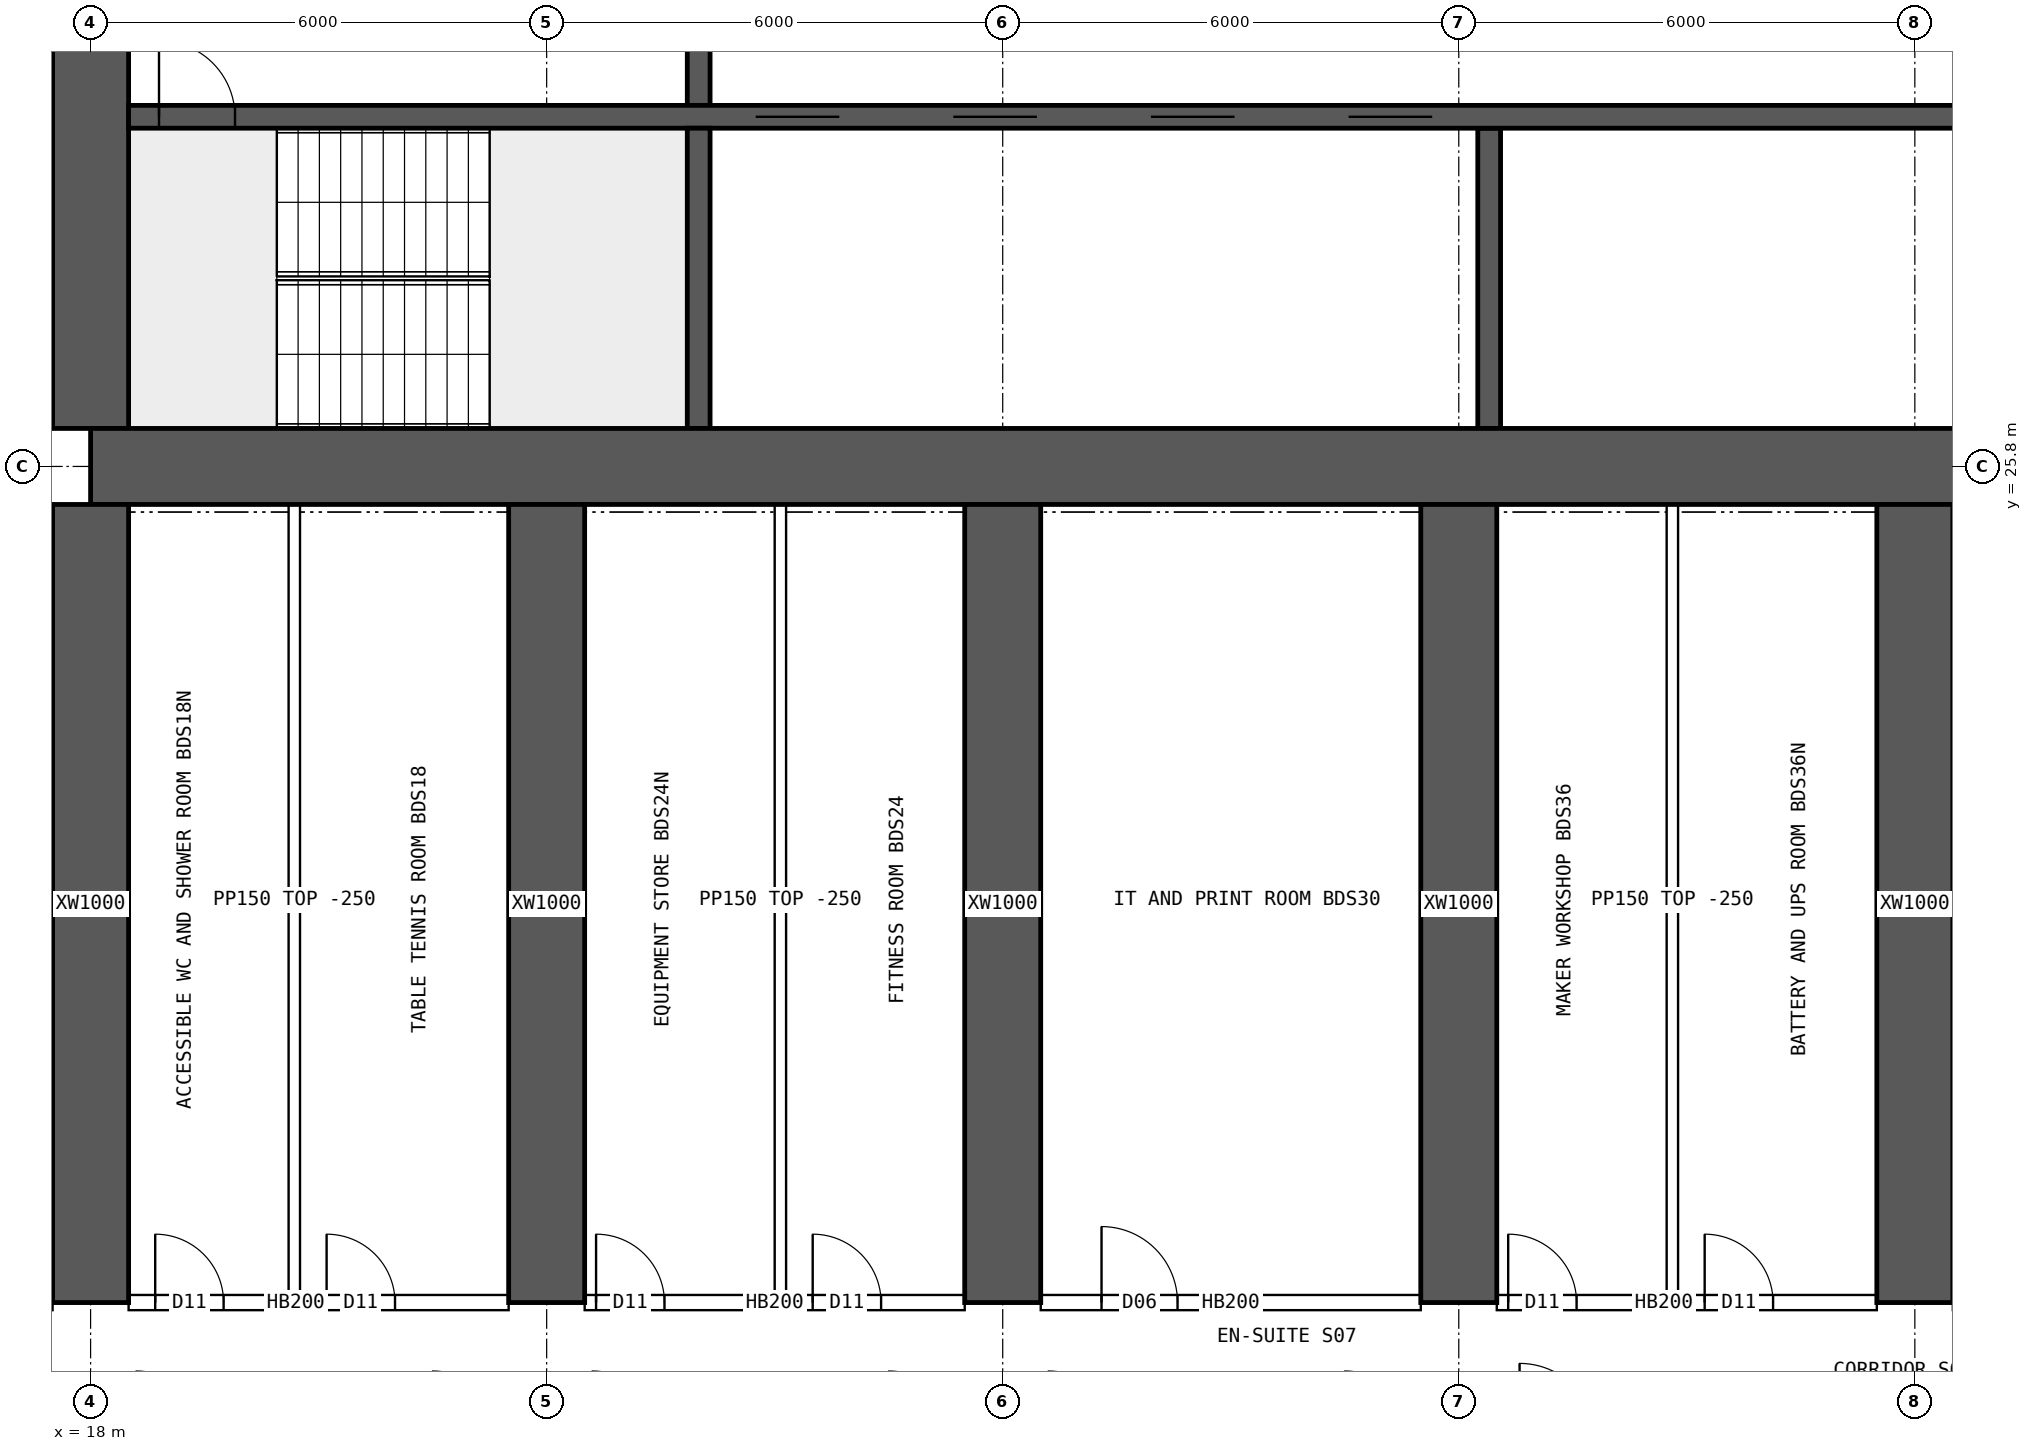
"""IFC4 building model, lengths in metres.
Left out: names, types, materials, properties, quantities, classifications, styles, units other than length and angle.
Written with IfcOpenShell. Run it as: python <this file> out.ifc"""

import sys

from ifc_helpers import new_model, si_unit, direction, frame, frame_2d, origin, place, context, subcontext, project, spatial, rectangle, extrude, element, fill, save


model = new_model("IFC4")
c1 = context("Model", 3, precision=1e-05, world=origin(), true_north=direction((0.0, 1.0)))
c2 = subcontext(c1, "Body", "Model", "MODEL_VIEW")
j1 = project(units=[si_unit("LENGTHUNIT", "METRE"), si_unit("PLANEANGLEUNIT", "RADIAN")], contexts=[c1])
p1 = place(None, origin())
s1 = spatial("IfcSite", under=j1, at=p1, CompositionType="ELEMENT")
p2 = place(p1, origin())
s2 = spatial("IfcBuilding", under=s1, at=p2, CompositionType="ELEMENT")
p3 = place(p2, frame((0.0, 0.0, 38.95)))
s3 = spatial("IfcBuildingStorey", under=s2, at=p3, CompositionType="ELEMENT", Elevation=38.95)
p4 = place(p3, frame((18.0, 25.8, 0.0), z_axis=(0.0, 0.0, 1.0), x_axis=(1.0, 0.0, 0.0)))
e1 = element("IfcWall", 1, at=p4, inside=s3, PredefinedType="SHEAR", context=c2, shape_type="SweptSolid", body=[
    extrude(rectangle(XDim=48.0, YDim=1.0, at=frame_2d((24.0, 0.0))), origin(), (0.0, 0.0, 1.0), 3.75),
])
p5 = place(p3, frame((18.0, 26.3, 0.0), z_axis=(0.0, 0.0, 1.0), x_axis=(0.0, 1.0, 0.0)))
e2 = element("IfcWall", 2, at=p5, inside=s3, PredefinedType="SHEAR", context=c2, shape_type="SweptSolid", body=[
    extrude(rectangle(XDim=11.4, YDim=1.0, at=frame_2d((5.7, 0.0))), origin(), (0.0, 0.0, 1.0), 3.75),
])
p6 = place(p5, frame((5.0, 0.0, 0.0)))
e3 = element("IfcOpeningElement", 3, at=p6, cuts=e2, PredefinedType="OPENING", context=c2, shape_type="SweptSolid", body=[
    extrude(rectangle(XDim=1.2, YDim=2.1, at=frame_2d((0.6, 1.05))), frame((0.0, 0.51, 0.0), z_axis=(0.0, -1.0, 0.0), x_axis=(1.0, 0.0, 0.0)), (0.0, 0.0, 1.0), 1.02),
])
p7 = place(p3, frame((18.5, 30.4, 0.0), z_axis=(0.0, 0.0, 1.0), x_axis=(1.0, 0.0, 0.0)))
e4 = element("IfcWall", 4, at=p7, inside=s3, PredefinedType="SHEAR", context=c2, shape_type="SweptSolid", body=[
    extrude(rectangle(XDim=47.0, YDim=0.3, at=frame_2d((23.5, 0.0))), origin(), (0.0, 0.0, 1.0), 3.75),
])
p8 = place(p7, frame((0.4, 0.0, 0.0)))
e5 = element("IfcOpeningElement", 5, at=p8, cuts=e4, PredefinedType="OPENING", context=c2, shape_type="SweptSolid", body=[
    extrude(rectangle(XDim=1.0, YDim=2.1, at=frame_2d((0.5, 1.05))), frame((0.0, 0.16, 0.0), z_axis=(0.0, -1.0, 0.0), x_axis=(1.0, 0.0, 0.0)), (0.0, 0.0, 1.0), 0.32),
])
p9 = place(p7, frame((45.6, 0.0, 0.0)))
e6 = element("IfcOpeningElement", 6, at=p9, cuts=e4, PredefinedType="OPENING", context=c2, shape_type="SweptSolid", body=[
    extrude(rectangle(XDim=1.0, YDim=2.1, at=frame_2d((0.5, 1.05))), frame((0.0, 0.16, 0.0), z_axis=(0.0, -1.0, 0.0), x_axis=(1.0, 0.0, 0.0)), (0.0, 0.0, 1.0), 0.32),
])
p10 = place(p7, frame((8.25, 0.0, 0.0)))
e7 = element("IfcOpeningElement", 7, at=p10, cuts=e4, PredefinedType="OPENING", context=c2, shape_type="SweptSolid", body=[
    extrude(rectangle(XDim=1.1, YDim=2.1, at=frame_2d((0.55, 1.05))), frame((0.0, 0.16, 0.0), z_axis=(0.0, -1.0, 0.0), x_axis=(1.0, 0.0, 0.0)), (0.0, 0.0, 1.0), 0.32),
])
p11 = place(p7, frame((10.85, 0.0, 0.0)))
e8 = element("IfcOpeningElement", 8, at=p11, cuts=e4, PredefinedType="OPENING", context=c2, shape_type="SweptSolid", body=[
    extrude(rectangle(XDim=1.1, YDim=2.1, at=frame_2d((0.55, 1.05))), frame((0.0, 0.16, 0.0), z_axis=(0.0, -1.0, 0.0), x_axis=(1.0, 0.0, 0.0)), (0.0, 0.0, 1.0), 0.32),
])
p12 = place(p7, frame((13.45, 0.0, 0.0)))
e9 = element("IfcOpeningElement", 9, at=p12, cuts=e4, PredefinedType="OPENING", context=c2, shape_type="SweptSolid", body=[
    extrude(rectangle(XDim=1.1, YDim=2.1, at=frame_2d((0.55, 1.05))), frame((0.0, 0.16, 0.0), z_axis=(0.0, -1.0, 0.0), x_axis=(1.0, 0.0, 0.0)), (0.0, 0.0, 1.0), 0.32),
])
p13 = place(p7, frame((16.05, 0.0, 0.0)))
e10 = element("IfcOpeningElement", 10, at=p13, cuts=e4, PredefinedType="OPENING", context=c2, shape_type="SweptSolid", body=[
    extrude(rectangle(XDim=1.1, YDim=2.1, at=frame_2d((0.55, 1.05))), frame((0.0, 0.16, 0.0), z_axis=(0.0, -1.0, 0.0), x_axis=(1.0, 0.0, 0.0)), (0.0, 0.0, 1.0), 0.32),
])
p14 = place(p7, frame((30.117, 0.0, 0.0)))
e11 = element("IfcOpeningElement", 11, at=p14, cuts=e4, PredefinedType="OPENING", context=c2, shape_type="SweptSolid", body=[
    extrude(rectangle(XDim=1.1, YDim=2.1, at=frame_2d((0.55, 1.05))), frame((0.0, 0.16, 0.0), z_axis=(0.0, -1.0, 0.0), x_axis=(1.0, 0.0, 0.0)), (0.0, 0.0, 1.0), 0.32),
])
p15 = place(p7, frame((33.65, 0.0, 0.0)))
e12 = element("IfcOpeningElement", 12, at=p15, cuts=e4, PredefinedType="OPENING", context=c2, shape_type="SweptSolid", body=[
    extrude(rectangle(XDim=1.1, YDim=2.1, at=frame_2d((0.55, 1.05))), frame((0.0, 0.16, 0.0), z_axis=(0.0, -1.0, 0.0), x_axis=(1.0, 0.0, 0.0)), (0.0, 0.0, 1.0), 0.32),
])
p16 = place(p7, frame((37.183, 0.0, 0.0)))
e13 = element("IfcOpeningElement", 13, at=p16, cuts=e4, PredefinedType="OPENING", context=c2, shape_type="SweptSolid", body=[
    extrude(rectangle(XDim=1.1, YDim=2.1, at=frame_2d((0.55, 1.05))), frame((0.0, 0.16, 0.0), z_axis=(0.0, -1.0, 0.0), x_axis=(1.0, 0.0, 0.0)), (0.0, 0.0, 1.0), 0.32),
])
p17 = place(p3, frame((26.0, 26.3, 0.0), z_axis=(0.0, 0.0, 1.0), x_axis=(0.0, 1.0, 0.0)))
e14 = element("IfcWall", 14, at=p17, inside=s3, PredefinedType="SHEAR", context=c2, shape_type="SweptSolid", body=[
    extrude(rectangle(XDim=3.95, YDim=0.3, at=frame_2d((1.975, 0.0))), origin(), (0.0, 0.0, 1.0), 3.75),
])
p18 = place(p3, frame((26.0, 30.55, 0.0), z_axis=(0.0, 0.0, 1.0), x_axis=(0.0, 1.0, 0.0)))
e15 = element("IfcWall", 15, at=p18, inside=s3, PredefinedType="SHEAR", context=c2, shape_type="SweptSolid", body=[
    extrude(rectangle(XDim=3.9, YDim=0.3, at=frame_2d((1.95, 0.0))), origin(), (0.0, 0.0, 1.0), 3.75),
])
p19 = place(p18, frame((1.4, 0.0, 0.0)))
e16 = element("IfcOpeningElement", 16, at=p19, cuts=e15, PredefinedType="OPENING", context=c2, shape_type="SweptSolid", body=[
    extrude(rectangle(XDim=1.2, YDim=2.1, at=frame_2d((0.6, 1.05))), frame((0.0, 0.16, 0.0), z_axis=(0.0, -1.0, 0.0), x_axis=(1.0, 0.0, 0.0)), (0.0, 0.0, 1.0), 0.32),
])
p20 = place(p3, frame((36.4, 26.3, 0.0), z_axis=(0.0, 0.0, 1.0), x_axis=(0.0, 1.0, 0.0)))
e17 = element("IfcWall", 17, at=p20, inside=s3, PredefinedType="SHEAR", context=c2, shape_type="SweptSolid", body=[
    extrude(rectangle(XDim=3.95, YDim=0.3, at=frame_2d((1.975, 0.0))), origin(), (0.0, 0.0, 1.0), 3.75),
])
for number, where, z_axis, x_axis in (
    (18, (18.0, 14.8, 0.0), (0.0, 0.0, 1.0), (0.0, 1.0, 0.0)),
    (19, (24.0, 14.8, 0.0), (0.0, 0.0, 1.0), (0.0, 1.0, 0.0)),
    (20, (30.0, 14.8, 0.0), (0.0, 0.0, 1.0), (0.0, 1.0, 0.0)),
    (21, (36.0, 14.8, 0.0), (0.0, 0.0, 1.0), (0.0, 1.0, 0.0)),
    (22, (42.0, 14.8, 0.0), (0.0, 0.0, 1.0), (0.0, 1.0, 0.0)),
):
    element("IfcWall", number, at=place(p3, frame(where, z_axis=z_axis, x_axis=x_axis)), inside=s3, PredefinedType="SHEAR", context=c2, shape_type="SweptSolid", body=[
        extrude(rectangle(XDim=10.5, YDim=1.0, at=frame_2d((5.25, 0.0))), origin(), (0.0, 0.0, 1.0), 3.75),
    ])
p21 = place(p3, frame((18.5, 14.8, 0.0), z_axis=(0.0, 0.0, 1.0), x_axis=(1.0, 0.0, 0.0)))
e23 = element("IfcWall", 23, at=p21, inside=s3, PredefinedType="SOLIDWALL", context=c2, shape_type="SweptSolid", body=[
    extrude(rectangle(XDim=5.0, YDim=0.2, at=frame_2d((2.5, 0.0))), origin(), (0.0, 0.0, 1.0), 3.5),
])
p22 = place(p21, frame((0.35, 0.0, 0.0)))
e24 = element("IfcOpeningElement", 24, at=p22, cuts=e23, PredefinedType="OPENING", context=c2, shape_type="SweptSolid", body=[
    extrude(rectangle(XDim=0.9, YDim=2.1, at=frame_2d((0.45, 1.05))), frame((0.0, 0.11, 0.0), z_axis=(0.0, -1.0, 0.0), x_axis=(1.0, 0.0, 0.0)), (0.0, 0.0, 1.0), 0.22),
])
p23 = place(p21, frame((2.605, 0.0, 0.0)))
e25 = element("IfcOpeningElement", 25, at=p23, cuts=e23, PredefinedType="OPENING", context=c2, shape_type="SweptSolid", body=[
    extrude(rectangle(XDim=0.9, YDim=2.1, at=frame_2d((0.45, 1.05))), frame((0.0, 0.11, 0.0), z_axis=(0.0, -1.0, 0.0), x_axis=(1.0, 0.0, 0.0)), (0.0, 0.0, 1.0), 0.22),
])
p24 = place(p3, frame((24.5, 14.8, 0.0), z_axis=(0.0, 0.0, 1.0), x_axis=(1.0, 0.0, 0.0)))
e26 = element("IfcWall", 26, at=p24, inside=s3, PredefinedType="SOLIDWALL", context=c2, shape_type="SweptSolid", body=[
    extrude(rectangle(XDim=5.0, YDim=0.2, at=frame_2d((2.5, 0.0))), origin(), (0.0, 0.0, 1.0), 3.5),
])
p25 = place(p24, frame((0.15, 0.0, 0.0)))
e27 = element("IfcOpeningElement", 27, at=p25, cuts=e26, PredefinedType="OPENING", context=c2, shape_type="SweptSolid", body=[
    extrude(rectangle(XDim=0.9, YDim=2.1, at=frame_2d((0.45, 1.05))), frame((0.0, 0.11, 0.0), z_axis=(0.0, -1.0, 0.0), x_axis=(1.0, 0.0, 0.0)), (0.0, 0.0, 1.0), 0.22),
])
p26 = place(p24, frame((3.0, 0.0, 0.0)))
e28 = element("IfcOpeningElement", 28, at=p26, cuts=e26, PredefinedType="OPENING", context=c2, shape_type="SweptSolid", body=[
    extrude(rectangle(XDim=0.9, YDim=2.1, at=frame_2d((0.45, 1.05))), frame((0.0, 0.11, 0.0), z_axis=(0.0, -1.0, 0.0), x_axis=(1.0, 0.0, 0.0)), (0.0, 0.0, 1.0), 0.22),
])
p27 = place(p3, frame((30.5, 14.8, 0.0), z_axis=(0.0, 0.0, 1.0), x_axis=(1.0, 0.0, 0.0)))
e29 = element("IfcWall", 29, at=p27, inside=s3, PredefinedType="SOLIDWALL", context=c2, shape_type="SweptSolid", body=[
    extrude(rectangle(XDim=5.0, YDim=0.2, at=frame_2d((2.5, 0.0))), origin(), (0.0, 0.0, 1.0), 3.5),
])
p28 = place(p27, frame((0.8, 0.0, 0.0)))
e30 = element("IfcOpeningElement", 30, at=p28, cuts=e29, PredefinedType="OPENING", context=c2, shape_type="SweptSolid", body=[
    extrude(rectangle(XDim=1.0, YDim=2.1, at=frame_2d((0.5, 1.05))), frame((0.0, 0.11, 0.0), z_axis=(0.0, -1.0, 0.0), x_axis=(1.0, 0.0, 0.0)), (0.0, 0.0, 1.0), 0.22),
])
p29 = place(p3, frame((36.5, 14.8, 0.0), z_axis=(0.0, 0.0, 1.0), x_axis=(1.0, 0.0, 0.0)))
e31 = element("IfcWall", 31, at=p29, inside=s3, PredefinedType="SOLIDWALL", context=c2, shape_type="SweptSolid", body=[
    extrude(rectangle(XDim=5.0, YDim=0.2, at=frame_2d((2.5, 0.0))), origin(), (0.0, 0.0, 1.0), 3.5),
])
p30 = place(p29, frame((0.15, 0.0, 0.0)))
e32 = element("IfcOpeningElement", 32, at=p30, cuts=e31, PredefinedType="OPENING", context=c2, shape_type="SweptSolid", body=[
    extrude(rectangle(XDim=0.9, YDim=2.1, at=frame_2d((0.45, 1.05))), frame((0.0, 0.11, 0.0), z_axis=(0.0, -1.0, 0.0), x_axis=(1.0, 0.0, 0.0)), (0.0, 0.0, 1.0), 0.22),
])
p31 = place(p29, frame((2.735, 0.0, 0.0)))
e33 = element("IfcOpeningElement", 33, at=p31, cuts=e31, PredefinedType="OPENING", context=c2, shape_type="SweptSolid", body=[
    extrude(rectangle(XDim=0.9, YDim=2.1, at=frame_2d((0.45, 1.05))), frame((0.0, 0.11, 0.0), z_axis=(0.0, -1.0, 0.0), x_axis=(1.0, 0.0, 0.0)), (0.0, 0.0, 1.0), 0.22),
])
for number, where, z_axis, x_axis in (
    (34, (20.68, 14.9, 0.0), (0.0, 0.0, 1.0), (0.0, 1.0, 0.0)),
    (35, (27.075, 14.9, 0.0), (0.0, 0.0, 1.0), (0.0, 1.0, 0.0)),
    (36, (38.81, 14.9, 0.0), (0.0, 0.0, 1.0), (0.0, 1.0, 0.0)),
):
    element("IfcWall", number, at=place(p3, frame(where, z_axis=z_axis, x_axis=x_axis)), inside=s3, PredefinedType="PARTITIONING", context=c2, shape_type="SweptSolid", body=[
        extrude(rectangle(XDim=10.4, YDim=0.15, at=frame_2d((5.2, 0.0))), origin(), (0.0, 0.0, 1.0), 3.5),
    ])
p32 = place(p8, origin())
e37 = element("IfcDoor", 37, at=p32, inside=s3, OperationType="SINGLE_SWING_LEFT", PredefinedType="DOOR", context=c2, shape_type="SweptSolid", body=[
    extrude(rectangle(XDim=1.0, YDim=2.1, at=frame_2d((0.5, 1.05))), frame((0.0, 0.025, 0.0), z_axis=(0.0, -1.0, 0.0), x_axis=(1.0, 0.0, 0.0)), (0.0, 0.0, 1.0), 0.05),
])
fill(e5, e37)
p33 = place(p10, origin())
e38 = element("IfcDoor", 38, at=p33, inside=s3, OperationType="DOUBLE_DOOR_SLIDING", PredefinedType="DOOR", context=c2, shape_type="SweptSolid", body=[
    extrude(rectangle(XDim=1.1, YDim=2.1, at=frame_2d((0.55, 1.05))), frame((0.0, 0.025, 0.0), z_axis=(0.0, -1.0, 0.0), x_axis=(1.0, 0.0, 0.0)), (0.0, 0.0, 1.0), 0.05),
])
fill(e7, e38)
p34 = place(p11, origin())
e39 = element("IfcDoor", 39, at=p34, inside=s3, OperationType="DOUBLE_DOOR_SLIDING", PredefinedType="DOOR", context=c2, shape_type="SweptSolid", body=[
    extrude(rectangle(XDim=1.1, YDim=2.1, at=frame_2d((0.55, 1.05))), frame((0.0, 0.025, 0.0), z_axis=(0.0, -1.0, 0.0), x_axis=(1.0, 0.0, 0.0)), (0.0, 0.0, 1.0), 0.05),
])
fill(e8, e39)
p35 = place(p12, origin())
e40 = element("IfcDoor", 40, at=p35, inside=s3, OperationType="DOUBLE_DOOR_SLIDING", PredefinedType="DOOR", context=c2, shape_type="SweptSolid", body=[
    extrude(rectangle(XDim=1.1, YDim=2.1, at=frame_2d((0.55, 1.05))), frame((0.0, 0.025, 0.0), z_axis=(0.0, -1.0, 0.0), x_axis=(1.0, 0.0, 0.0)), (0.0, 0.0, 1.0), 0.05),
])
fill(e9, e40)
p36 = place(p13, origin())
e41 = element("IfcDoor", 41, at=p36, inside=s3, OperationType="DOUBLE_DOOR_SLIDING", PredefinedType="DOOR", context=c2, shape_type="SweptSolid", body=[
    extrude(rectangle(XDim=1.1, YDim=2.1, at=frame_2d((0.55, 1.05))), frame((0.0, 0.025, 0.0), z_axis=(0.0, -1.0, 0.0), x_axis=(1.0, 0.0, 0.0)), (0.0, 0.0, 1.0), 0.05),
])
fill(e10, e41)
p37 = place(p22, origin())
e42 = element("IfcDoor", 42, at=p37, inside=s3, OperationType="SINGLE_SWING_LEFT", PredefinedType="DOOR", context=c2, shape_type="SweptSolid", body=[
    extrude(rectangle(XDim=0.9, YDim=2.1, at=frame_2d((0.45, 1.05))), frame((0.0, 0.025, 0.0), z_axis=(0.0, -1.0, 0.0), x_axis=(1.0, 0.0, 0.0)), (0.0, 0.0, 1.0), 0.05),
])
fill(e24, e42)
p38 = place(p23, origin())
e43 = element("IfcDoor", 43, at=p38, inside=s3, OperationType="SINGLE_SWING_LEFT", PredefinedType="DOOR", context=c2, shape_type="SweptSolid", body=[
    extrude(rectangle(XDim=0.9, YDim=2.1, at=frame_2d((0.45, 1.05))), frame((0.0, 0.025, 0.0), z_axis=(0.0, -1.0, 0.0), x_axis=(1.0, 0.0, 0.0)), (0.0, 0.0, 1.0), 0.05),
])
fill(e25, e43)
p39 = place(p25, origin())
e44 = element("IfcDoor", 44, at=p39, inside=s3, OperationType="SINGLE_SWING_LEFT", PredefinedType="DOOR", context=c2, shape_type="SweptSolid", body=[
    extrude(rectangle(XDim=0.9, YDim=2.1, at=frame_2d((0.45, 1.05))), frame((0.0, 0.025, 0.0), z_axis=(0.0, -1.0, 0.0), x_axis=(1.0, 0.0, 0.0)), (0.0, 0.0, 1.0), 0.05),
])
fill(e27, e44)
p40 = place(p26, origin())
e45 = element("IfcDoor", 45, at=p40, inside=s3, OperationType="SINGLE_SWING_LEFT", PredefinedType="DOOR", context=c2, shape_type="SweptSolid", body=[
    extrude(rectangle(XDim=0.9, YDim=2.1, at=frame_2d((0.45, 1.05))), frame((0.0, 0.025, 0.0), z_axis=(0.0, -1.0, 0.0), x_axis=(1.0, 0.0, 0.0)), (0.0, 0.0, 1.0), 0.05),
])
fill(e28, e45)
p41 = place(p28, origin())
e46 = element("IfcDoor", 46, at=p41, inside=s3, OperationType="SINGLE_SWING_LEFT", PredefinedType="DOOR", context=c2, shape_type="SweptSolid", body=[
    extrude(rectangle(XDim=1.0, YDim=2.1, at=frame_2d((0.5, 1.05))), frame((0.0, 0.025, 0.0), z_axis=(0.0, -1.0, 0.0), x_axis=(1.0, 0.0, 0.0)), (0.0, 0.0, 1.0), 0.05),
])
fill(e30, e46)
p42 = place(p30, origin())
e47 = element("IfcDoor", 47, at=p42, inside=s3, OperationType="SINGLE_SWING_LEFT", PredefinedType="DOOR", context=c2, shape_type="SweptSolid", body=[
    extrude(rectangle(XDim=0.9, YDim=2.1, at=frame_2d((0.45, 1.05))), frame((0.0, 0.025, 0.0), z_axis=(0.0, -1.0, 0.0), x_axis=(1.0, 0.0, 0.0)), (0.0, 0.0, 1.0), 0.05),
])
fill(e32, e47)
p43 = place(p31, origin())
e48 = element("IfcDoor", 48, at=p43, inside=s3, OperationType="SINGLE_SWING_LEFT", PredefinedType="DOOR", context=c2, shape_type="SweptSolid", body=[
    extrude(rectangle(XDim=0.9, YDim=2.1, at=frame_2d((0.45, 1.05))), frame((0.0, 0.025, 0.0), z_axis=(0.0, -1.0, 0.0), x_axis=(1.0, 0.0, 0.0)), (0.0, 0.0, 1.0), 0.05),
])
fill(e33, e48)
save(model, sys.argv[1])
